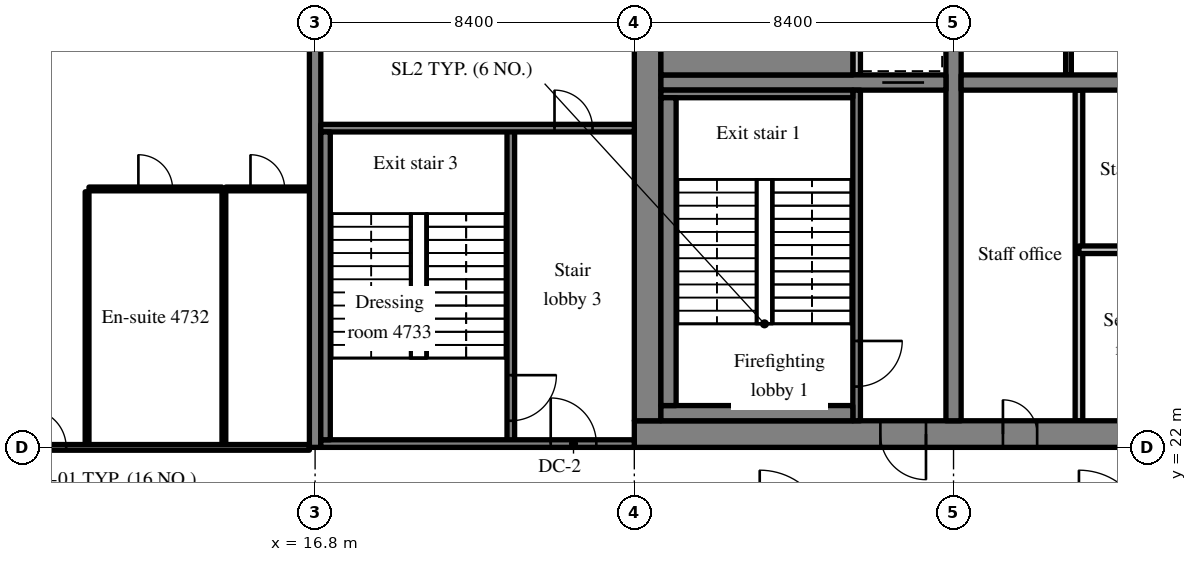
"""IFC4 building model, lengths in metres.
Left out: names, types, materials, properties, quantities, classifications, styles, units other than length and angle.
Written with IfcOpenShell. Run it as: python <this file> out.ifc"""

import sys

from ifc_helpers import new_model, si_unit, direction, frame, frame_2d, origin, place, context, subcontext, project, spatial, rectangle, extrude, source, transform, mapped, element, fill, save


model = new_model("IFC4")
c1 = context("Model", 3, precision=1e-05, world=origin(), true_north=direction((0.0, 1.0)))
c2 = subcontext(c1, "Body", "Model", "MODEL_VIEW")
j1 = project(units=[si_unit("LENGTHUNIT", "METRE"), si_unit("PLANEANGLEUNIT", "RADIAN")], contexts=[c1])
p1 = place(None, origin())
s1 = spatial("IfcSite", under=j1, at=p1, CompositionType="ELEMENT")
p2 = place(p1, origin())
s2 = spatial("IfcBuilding", under=s1, at=p2, CompositionType="ELEMENT")
p3 = place(p2, frame((0.0, 0.0, 193.4)))
s3 = spatial("IfcBuildingStorey", under=s2, at=p3, CompositionType="ELEMENT", Elevation=193.4)
m1 = source(origin(), c2, "Body", "SweptSolid", [
    extrude(rectangle(XDim=50.4, YDim=0.7, at=frame_2d((25.2, 0.0))), origin(), (0.0, 0.0, 1.0), 3.52),
])
p4 = place(p3, frame((25.2, 22.35, 0.0), z_axis=(0.0, 0.0, 1.0), x_axis=(1.0, 0.0, 0.0)))
e1 = element("IfcWall", 1, at=p4, inside=s3, PredefinedType="SHEAR", context=c2, shape_type="MappedRepresentation", body=[
    mapped(m1, transform((0.0, 0.0, 0.0), scale=1.0)),
])
m2 = source(origin(), c2, "Body", "SweptSolid", [
    extrude(rectangle(XDim=1.8, YDim=2.1, at=frame_2d((0.9, 1.05))), frame((0.0, 0.36, 0.0), z_axis=(0.0, -1.0, 0.0), x_axis=(1.0, 0.0, 0.0)), (0.0, 0.0, 1.0), 0.72),
])
p5 = place(p4, frame((15.9, 0.0, 0.0)))
e2 = element("IfcOpeningElement", 2, at=p5, cuts=e1, PredefinedType="OPENING", context=c2, shape_type="MappedRepresentation", body=[
    mapped(m2, transform((0.0, 0.0, 0.0), scale=1.0)),
])
m3 = source(origin(), c2, "Body", "SweptSolid", [
    extrude(rectangle(XDim=0.9, YDim=2.1, at=frame_2d((0.45, 1.05))), frame((0.0, 0.36, 0.0), z_axis=(0.0, -1.0, 0.0), x_axis=(1.0, 0.0, 0.0)), (0.0, 0.0, 1.0), 0.72),
])
p6 = place(p4, frame((9.7, 0.0, 0.0)))
e3 = element("IfcOpeningElement", 3, at=p6, cuts=e1, PredefinedType="OPENING", context=c2, shape_type="MappedRepresentation", body=[
    mapped(m3, transform((0.0, 0.0, 0.0), scale=1.0)),
])
p7 = place(p4, frame((21.5, 0.0, 0.0)))
e4 = element("IfcOpeningElement", 4, at=p7, cuts=e1, PredefinedType="OPENING", context=c2, shape_type="MappedRepresentation", body=[
    mapped(m3, transform((0.0, 0.0, 0.0), scale=1.0)),
])
p8 = place(p4, frame((32.7, 0.0, 0.0)))
e5 = element("IfcOpeningElement", 5, at=p8, cuts=e1, PredefinedType="OPENING", context=c2, shape_type="MappedRepresentation", body=[
    mapped(m2, transform((0.0, 0.0, 0.0), scale=1.0)),
])
m4 = source(origin(), c2, "Body", "SweptSolid", [
    extrude(rectangle(XDim=1.2, YDim=2.1, at=frame_2d((0.6, 1.05))), frame((0.0, 0.36, 0.0), z_axis=(0.0, -1.0, 0.0), x_axis=(1.0, 0.0, 0.0)), (0.0, 0.0, 1.0), 0.72),
])
p9 = place(p4, frame((6.475, 0.0, 0.0)))
e6 = element("IfcOpeningElement", 6, at=p9, cuts=e1, PredefinedType="OPENING", context=c2, shape_type="MappedRepresentation", body=[
    mapped(m4, transform((0.0, 0.0, 0.0), scale=1.0)),
])
p10 = place(p4, frame((47.875, 0.0, 0.0)))
e7 = element("IfcOpeningElement", 7, at=p10, cuts=e1, PredefinedType="OPENING", context=c2, shape_type="MappedRepresentation", body=[
    mapped(m4, transform((0.0, 0.0, 0.0), scale=1.0)),
])
m5 = source(origin(), c2, "Body", "SweptSolid", [
    extrude(rectangle(XDim=18.6, YDim=0.7, at=frame_2d((9.3, 0.0))), origin(), (0.0, 0.0, 1.0), 3.52),
])
p11 = place(p3, frame((25.55, 22.7, 0.0), z_axis=(0.0, 0.0, 1.0), x_axis=(0.0, 1.0, 0.0)))
e8 = element("IfcWall", 8, at=p11, inside=s3, PredefinedType="SHEAR", context=c2, shape_type="MappedRepresentation", body=[
    mapped(m5, transform((0.0, 0.0, 0.0), scale=1.0)),
])
m6 = source(origin(), c2, "Body", "SweptSolid", [
    extrude(rectangle(XDim=18.6, YDim=0.4, at=frame_2d((9.3, 0.0))), origin(), (0.0, 0.0, 1.0), 3.52),
])
p12 = place(p3, frame((33.6, 22.7, 0.0), z_axis=(0.0, 0.0, 1.0), x_axis=(0.0, 1.0, 0.0)))
e9 = element("IfcWall", 9, at=p12, inside=s3, PredefinedType="SHEAR", context=c2, shape_type="MappedRepresentation", body=[
    mapped(m6, transform((0.0, 0.0, 0.0), scale=1.0)),
])
m7 = source(origin(), c2, "Body", "SweptSolid", [
    extrude(rectangle(XDim=1.1, YDim=2.1, at=frame_2d((0.55, 1.05))), frame((0.0, 0.21, 0.0), z_axis=(0.0, -1.0, 0.0), x_axis=(1.0, 0.0, 0.0)), (0.0, 0.0, 1.0), 0.42),
])
p13 = place(p12, frame((12.75, 0.0, 0.0)))
e10 = element("IfcOpeningElement", 10, at=p13, cuts=e9, PredefinedType="OPENING", context=c2, shape_type="MappedRepresentation", body=[
    mapped(m7, transform((0.0, 0.0, 0.0), scale=1.0)),
])
m8 = source(origin(), c2, "Body", "SweptSolid", [
    extrude(rectangle(XDim=7.5, YDim=0.4, at=frame_2d((3.75, 0.0))), origin(), (0.0, 0.0, 1.0), 3.52),
])
p14 = place(p3, frame((25.9, 31.6, 0.0), z_axis=(0.0, 0.0, 1.0), x_axis=(1.0, 0.0, 0.0)))
e11 = element("IfcWall", 11, at=p14, inside=s3, PredefinedType="SHEAR", context=c2, shape_type="MappedRepresentation", body=[
    mapped(m8, transform((0.0, 0.0, 0.0), scale=1.0)),
])
p15 = place(p14, frame((5.825, 0.0, 0.0)))
e12 = element("IfcOpeningElement", 12, at=p15, cuts=e11, PredefinedType="OPENING", context=c2, shape_type="MappedRepresentation", body=[
    mapped(m7, transform((0.0, 0.0, 0.0), scale=1.0)),
])
m9 = source(origin(), c2, "Body", "SweptSolid", [
    extrude(rectangle(XDim=16.4, YDim=0.4, at=frame_2d((8.2, 0.0))), origin(), (0.0, 0.0, 1.0), 3.52),
])
p16 = place(p3, frame((33.8, 31.6, 0.0), z_axis=(0.0, 0.0, 1.0), x_axis=(1.0, 0.0, 0.0)))
e13 = element("IfcWall", 13, at=p16, inside=s3, PredefinedType="SHEAR", context=c2, shape_type="MappedRepresentation", body=[
    mapped(m9, transform((0.0, 0.0, 0.0), scale=1.0)),
])
m10 = source(origin(), c2, "Body", "SweptSolid", [
    extrude(rectangle(XDim=1.0, YDim=2.1, at=frame_2d((0.5, 1.05))), frame((0.0, 0.21, 0.0), z_axis=(0.0, -1.0, 0.0), x_axis=(1.0, 0.0, 0.0)), (0.0, 0.0, 1.0), 0.42),
])
p17 = place(p16, frame((14.8, 0.0, 0.0)))
e14 = element("IfcOpeningElement", 14, at=p17, cuts=e13, PredefinedType="OPENING", context=c2, shape_type="MappedRepresentation", body=[
    mapped(m10, transform((0.0, 0.0, 0.0), scale=1.0)),
])
m11 = source(origin(), c2, "Body", "SweptSolid", [
    extrude(rectangle(XDim=20.0, YDim=0.3, at=frame_2d((10.0, 0.0))), origin(), (0.0, 0.0, 1.0), 3.52),
])
p18 = place(p3, frame((16.8, 22.0, 0.0), z_axis=(0.0, 0.0, 1.0), x_axis=(0.0, 1.0, 0.0)))
e15 = element("IfcWall", 15, at=p18, inside=s3, PredefinedType="SHEAR", context=c2, shape_type="MappedRepresentation", body=[
    mapped(m11, transform((0.0, 0.0, 0.0), scale=1.0)),
])
m12 = source(origin(), c2, "Body", "SweptSolid", [
    extrude(rectangle(XDim=8.7, YDim=0.2, at=frame_2d((4.35, 0.0))), origin(), (0.0, 0.0, 1.0), 3.52),
])
p19 = place(p3, frame((36.9, 22.7, 0.0), z_axis=(0.0, 0.0, 1.0), x_axis=(0.0, 1.0, 0.0)))
e16 = element("IfcWall", 16, at=p19, inside=s3, PredefinedType="PARTITIONING", context=c2, shape_type="MappedRepresentation", body=[
    mapped(m12, transform((0.0, 0.0, 0.0), scale=1.0)),
])
m13 = source(origin(), c2, "Body", "SweptSolid", [
    extrude(rectangle(XDim=3.0, YDim=0.2, at=frame_2d((1.5, 0.0))), origin(), (0.0, 0.0, 1.0), 3.52),
])
p20 = place(p3, frame((36.9, 27.2, 0.0), z_axis=(0.0, 0.0, 1.0), x_axis=(1.0, 0.0, 0.0)))
e17 = element("IfcWall", 17, at=p20, inside=s3, PredefinedType="PARTITIONING", context=c2, shape_type="MappedRepresentation", body=[
    mapped(m13, transform((0.0, 0.0, 0.0), scale=1.0)),
])
m14 = source(origin(), c2, "Body", "SweptSolid", [
    extrude(rectangle(XDim=3.2, YDim=0.15, at=frame_2d((1.6, 0.0))), origin(), (0.0, 0.0, 1.0), 3.52),
])
p21 = place(p3, frame((36.625, 31.8, 0.0), z_axis=(0.0, 0.0, 1.0), x_axis=(0.0, 1.0, 0.0)))
e18 = element("IfcWall", 18, at=p21, inside=s3, PredefinedType="PARTITIONING", context=c2, shape_type="MappedRepresentation", body=[
    mapped(m14, transform((0.0, 0.0, 0.0), scale=1.0)),
])
m15 = source(origin(), c2, "Body", "SweptSolid", [
    extrude(rectangle(XDim=8.7, YDim=0.2, at=frame_2d((4.35, 0.0))), origin(), (0.0, 0.0, 1.0), 3.52),
])
p22 = place(p3, frame((31.05, 22.7, 0.0), z_axis=(0.0, 0.0, 1.0), x_axis=(0.0, 1.0, 0.0)))
e19 = element("IfcWall", 19, at=p22, inside=s3, PredefinedType="SOLIDWALL", context=c2, shape_type="MappedRepresentation", body=[
    mapped(m15, transform((0.0, 0.0, 0.0), scale=1.0)),
])
m16 = source(origin(), c2, "Body", "SweptSolid", [
    extrude(rectangle(XDim=1.2, YDim=2.1, at=frame_2d((0.6, 1.05))), frame((0.0, 0.11, 0.0), z_axis=(0.0, -1.0, 0.0), x_axis=(1.0, 0.0, 0.0)), (0.0, 0.0, 1.0), 0.22),
])
p23 = place(p22, frame((0.9, 0.0, 0.0)))
e20 = element("IfcOpeningElement", 20, at=p23, cuts=e19, PredefinedType="OPENING", context=c2, shape_type="MappedRepresentation", body=[
    mapped(m16, transform((0.0, 0.0, 0.0), scale=1.0)),
])
m17 = source(origin(), c2, "Body", "SweptSolid", [
    extrude(rectangle(XDim=1.8, YDim=0.2, at=frame_2d((0.9, 0.0))), origin(), (0.0, 0.0, 1.0), 3.52),
])
p24 = place(p3, frame((31.05, 31.8, 0.0), z_axis=(0.0, 0.0, 1.0), x_axis=(0.0, 1.0, 0.0)))
e21 = element("IfcWall", 21, at=p24, inside=s3, PredefinedType="SOLIDWALL", context=c2, shape_type="MappedRepresentation", body=[
    mapped(m17, transform((0.0, 0.0, 0.0), scale=1.0)),
])
m18 = source(origin(), c2, "Body", "SweptSolid", [
    extrude(rectangle(XDim=8.3, YDim=0.2, at=frame_2d((4.15, 0.0))), origin(), (0.0, 0.0, 1.0), 3.52),
])
p25 = place(p3, frame((21.95, 22.1, 0.0), z_axis=(0.0, 0.0, 1.0), x_axis=(0.0, 1.0, 0.0)))
e22 = element("IfcWall", 22, at=p25, inside=s3, PredefinedType="SOLIDWALL", context=c2, shape_type="MappedRepresentation", body=[
    mapped(m18, transform((0.0, 0.0, 0.0), scale=1.0)),
])
p26 = place(p25, frame((0.6, 0.0, 0.0)))
e23 = element("IfcOpeningElement", 23, at=p26, cuts=e22, PredefinedType="OPENING", context=c2, shape_type="MappedRepresentation", body=[
    mapped(m16, transform((0.0, 0.0, 0.0), scale=1.0)),
])
m19 = source(origin(), c2, "Body", "SweptSolid", [
    extrude(rectangle(XDim=8.25, YDim=0.2, at=frame_2d((4.125, 0.0))), origin(), (0.0, 0.0, 1.0), 3.52),
])
p27 = place(p3, frame((16.95, 22.1, 0.0), z_axis=(0.0, 0.0, 1.0), x_axis=(1.0, 0.0, 0.0)))
e24 = element("IfcWall", 24, at=p27, inside=s3, PredefinedType="SOLIDWALL", context=c2, shape_type="MappedRepresentation", body=[
    mapped(m19, transform((0.0, 0.0, 0.0), scale=1.0)),
])
p28 = place(p27, frame((6.05, 0.0, 0.0)))
e25 = element("IfcOpeningElement", 25, at=p28, cuts=e24, PredefinedType="OPENING", context=c2, shape_type="MappedRepresentation", body=[
    mapped(m16, transform((0.0, 0.0, 0.0), scale=1.0)),
])
p29 = place(p3, frame((16.95, 30.4, 0.0), z_axis=(0.0, 0.0, 1.0), x_axis=(1.0, 0.0, 0.0)))
e26 = element("IfcWall", 26, at=p29, inside=s3, PredefinedType="SOLIDWALL", context=c2, shape_type="MappedRepresentation", body=[
    mapped(m19, transform((0.0, 0.0, 0.0), scale=1.0)),
])
m20 = source(origin(), c2, "Body", "SweptSolid", [
    extrude(rectangle(XDim=1.0, YDim=2.1, at=frame_2d((0.5, 1.05))), frame((0.0, 0.11, 0.0), z_axis=(0.0, -1.0, 0.0), x_axis=(1.0, 0.0, 0.0)), (0.0, 0.0, 1.0), 0.22),
])
p30 = place(p29, frame((6.15, 0.0, 0.0)))
e27 = element("IfcOpeningElement", 27, at=p30, cuts=e26, PredefinedType="OPENING", context=c2, shape_type="MappedRepresentation", body=[
    mapped(m20, transform((0.0, 0.0, 0.0), scale=1.0)),
])
m21 = source(origin(), c2, "Body", "SweptSolid", [
    extrude(rectangle(XDim=5.05, YDim=0.4, at=frame_2d((2.525, 0.0))), origin(), (0.0, 0.0, 1.0), 3.52),
])
p31 = place(p3, frame((25.9, 22.9, 0.0), z_axis=(0.0, 0.0, 1.0), x_axis=(1.0, 0.0, 0.0)))
e28 = element("IfcWall", 28, at=p31, inside=s3, PredefinedType="SOLIDWALL", context=c2, shape_type="MappedRepresentation", body=[
    mapped(m21, transform((0.0, 0.0, 0.0), scale=1.0)),
])
m22 = source(origin(), c2, "Body", "SweptSolid", [
    extrude(rectangle(XDim=5.05, YDim=0.2, at=frame_2d((2.525, 0.0))), origin(), (0.0, 0.0, 1.0), 3.52),
])
p32 = place(p3, frame((25.9, 31.3, 0.0), z_axis=(0.0, 0.0, 1.0), x_axis=(1.0, 0.0, 0.0)))
e29 = element("IfcWall", 29, at=p32, inside=s3, PredefinedType="SOLIDWALL", context=c2, shape_type="MappedRepresentation", body=[
    mapped(m22, transform((0.0, 0.0, 0.0), scale=1.0)),
])
m23 = source(origin(), c2, "Body", "SweptSolid", [
    extrude(rectangle(XDim=8.1, YDim=0.4, at=frame_2d((4.05, 0.0))), origin(), (0.0, 0.0, 1.0), 3.52),
])
p33 = place(p3, frame((26.1, 23.1, 0.0), z_axis=(0.0, 0.0, 1.0), x_axis=(0.0, 1.0, 0.0)))
e30 = element("IfcWall", 30, at=p33, inside=s3, PredefinedType="SOLIDWALL", context=c2, shape_type="MappedRepresentation", body=[
    mapped(m23, transform((0.0, 0.0, 0.0), scale=1.0)),
])
m24 = source(origin(), c2, "Body", "SweptSolid", [
    extrude(rectangle(XDim=8.1, YDim=0.25, at=frame_2d((4.05, 0.0))), origin(), (0.0, 0.0, 1.0), 3.52),
])
p34 = place(p3, frame((17.075, 22.2, 0.0), z_axis=(0.0, 0.0, 1.0), x_axis=(0.0, 1.0, 0.0)))
e31 = element("IfcWall", 31, at=p34, inside=s3, PredefinedType="SOLIDWALL", context=c2, shape_type="MappedRepresentation", body=[
    mapped(m24, transform((0.0, 0.0, 0.0), scale=1.0)),
])
m25 = source(origin(), c2, "Body", "SweptSolid", [
    extrude(rectangle(XDim=5.05, YDim=1.0, at=frame_2d((2.525, 0.0))), origin(), (0.0, 0.0, 1.0), 3.52),
])
p35 = place(p3, frame((25.9, 32.3, 0.0), z_axis=(0.0, 0.0, 1.0), x_axis=(1.0, 0.0, 0.0)))
e32 = element("IfcWall", 32, at=p35, inside=s3, PredefinedType="SOLIDWALL", context=c2, shape_type="MappedRepresentation", body=[
    mapped(m25, transform((0.0, 0.0, 0.0), scale=1.0)),
])
m26 = source(origin(), c2, "Body", "SweptSolid", [
    extrude(rectangle(XDim=6.65, YDim=0.1, at=frame_2d((3.325, 0.0))), origin(), (0.0, 0.0, 1.0), 3.52),
])
for number, where, z_axis, x_axis in (
    (33, (10.8, 22.075, 0.0), (0.0, 0.0, 1.0), (0.0, 1.0, 0.0)),
    (34, (14.4, 22.075, 0.0), (0.0, 0.0, 1.0), (0.0, 1.0, 0.0)),
):
    element("IfcWall", number, at=place(p3, frame(where, z_axis=z_axis, x_axis=x_axis)), inside=s3, PredefinedType="PARTITIONING", context=c2, shape_type="MappedRepresentation", body=[
        mapped(m26, transform((0.0, 0.0, 0.0), scale=1.0)),
    ])
m27 = source(origin(), c2, "Body", "SweptSolid", [
    extrude(rectangle(XDim=3.5, YDim=0.1, at=frame_2d((1.75, 0.0))), origin(), (0.0, 0.0, 1.0), 3.52),
])
p36 = place(p3, frame((10.85, 28.8, 0.0), z_axis=(0.0, 0.0, 1.0), x_axis=(1.0, 0.0, 0.0)))
e35 = element("IfcWall", 35, at=p36, inside=s3, PredefinedType="PARTITIONING", context=c2, shape_type="MappedRepresentation", body=[
    mapped(m27, transform((0.0, 0.0, 0.0), scale=1.0)),
])
m28 = source(origin(), c2, "Body", "SweptSolid", [
    extrude(rectangle(XDim=0.9, YDim=2.1, at=frame_2d((0.45, 1.05))), frame((0.0, 0.06, 0.0), z_axis=(0.0, -1.0, 0.0), x_axis=(1.0, 0.0, 0.0)), (0.0, 0.0, 1.0), 0.12),
])
p37 = place(p36, frame((1.3, 0.0, 0.0)))
e36 = element("IfcOpeningElement", 36, at=p37, cuts=e35, PredefinedType="OPENING", context=c2, shape_type="MappedRepresentation", body=[
    mapped(m28, transform((0.0, 0.0, 0.0), scale=1.0)),
])
m29 = source(origin(), c2, "Body", "SweptSolid", [
    extrude(rectangle(XDim=2.2, YDim=0.1, at=frame_2d((1.1, 0.0))), origin(), (0.0, 0.0, 1.0), 3.52),
])
p38 = place(p3, frame((14.45, 28.8, 0.0), z_axis=(0.0, 0.0, 1.0), x_axis=(1.0, 0.0, 0.0)))
e37 = element("IfcWall", 37, at=p38, inside=s3, PredefinedType="PARTITIONING", context=c2, shape_type="MappedRepresentation", body=[
    mapped(m29, transform((0.0, 0.0, 0.0), scale=1.0)),
])
p39 = place(p38, frame((0.65, 0.0, 0.0)))
e38 = element("IfcOpeningElement", 38, at=p39, cuts=e37, PredefinedType="OPENING", context=c2, shape_type="MappedRepresentation", body=[
    mapped(m28, transform((0.0, 0.0, 0.0), scale=1.0)),
])
m30 = source(origin(), c2, "Body", "SweptSolid", [
    extrude(rectangle(XDim=7.95, YDim=0.15, at=frame_2d((3.975, 0.0))), origin(), (0.0, 0.0, 1.0), 2.82),
])
p40 = place(p3, frame((8.7, 22.0, 0.0), z_axis=(0.0, 0.0, 1.0), x_axis=(1.0, 0.0, 0.0)))
e39 = element("IfcWall", 39, at=p40, inside=s3, PredefinedType="PARTITIONING", context=c2, shape_type="MappedRepresentation", body=[
    mapped(m30, transform((0.0, 0.0, 0.0), scale=1.0)),
])
m31 = source(origin(), c2, "Body", "SweptSolid", [
    extrude(rectangle(XDim=1.0, YDim=2.1, at=frame_2d((0.5, 1.05))), frame((0.0, 0.085, 0.0), z_axis=(0.0, -1.0, 0.0), x_axis=(1.0, 0.0, 0.0)), (0.0, 0.0, 1.0), 0.17),
])
p41 = place(p40, frame((0.55, 0.0, 0.0)))
e40 = element("IfcOpeningElement", 40, at=p41, cuts=e39, PredefinedType="OPENING", context=c2, shape_type="MappedRepresentation", body=[
    mapped(m31, transform((0.0, 0.0, 0.0), scale=1.0)),
])
m32 = source(origin(), c2, "Body", "SweptSolid", [
    extrude(rectangle(XDim=0.9, YDim=2.1, at=frame_2d((0.45, 1.05))), frame((0.0, 0.275, 0.0), z_axis=(0.0, -1.0, 0.0), x_axis=(1.0, 0.0, 0.0)), (0.0, 0.0, 1.0), 0.05),
])
p42 = place(p6, origin())
e41 = element("IfcDoor", 41, at=p42, inside=s3, OperationType="SINGLE_SWING_LEFT", PredefinedType="DOOR", context=c2, shape_type="MappedRepresentation", body=[
    mapped(m32, transform((0.0, 0.0, 0.0), scale=1.0)),
])
fill(e3, e41)
m33 = source(origin(), c2, "Body", "SweptSolid", [
    extrude(rectangle(XDim=1.2, YDim=2.1, at=frame_2d((0.6, 1.05))), frame((0.0, 0.025, 0.0), z_axis=(0.0, -1.0, 0.0), x_axis=(1.0, 0.0, 0.0)), (0.0, 0.0, 1.0), 0.05),
])
p43 = place(p23, origin())
e42 = element("IfcDoor", 42, at=p43, inside=s3, OperationType="SINGLE_SWING_RIGHT", PredefinedType="DOOR", context=c2, shape_type="MappedRepresentation", body=[
    mapped(m33, transform((0.0, 0.0, 0.0), scale=1.0)),
])
fill(e20, e42)
m34 = source(origin(), c2, "Body", "SweptSolid", [
    extrude(rectangle(XDim=1.2, YDim=2.1, at=frame_2d((0.6, 1.05))), frame((0.0, 0.275, 0.0), z_axis=(0.0, -1.0, 0.0), x_axis=(1.0, 0.0, 0.0)), (0.0, 0.0, 1.0), 0.05),
])
p44 = place(p9, origin())
e43 = element("IfcDoor", 43, at=p44, inside=s3, OperationType="SINGLE_SWING_RIGHT", PredefinedType="DOOR", context=c2, shape_type="MappedRepresentation", body=[
    mapped(m34, transform((0.0, 0.0, 0.0), scale=1.0)),
])
fill(e6, e43)
m35 = source(origin(), c2, "Body", "SweptSolid", [
    extrude(rectangle(XDim=1.1, YDim=2.1, at=frame_2d((0.55, 1.05))), frame((0.0, 0.025, 0.0), z_axis=(0.0, -1.0, 0.0), x_axis=(1.0, 0.0, 0.0)), (0.0, 0.0, 1.0), 0.05),
])
p45 = place(p15, origin())
e44 = element("IfcDoor", 44, at=p45, inside=s3, OperationType="SLIDING_TO_RIGHT", PredefinedType="DOOR", context=c2, shape_type="MappedRepresentation", body=[
    mapped(m35, transform((0.0, 0.0, 0.0), scale=1.0)),
])
fill(e12, e44)
p46 = place(p26, origin())
e45 = element("IfcDoor", 45, at=p46, inside=s3, OperationType="SINGLE_SWING_RIGHT", PredefinedType="DOOR", context=c2, shape_type="MappedRepresentation", body=[
    mapped(m33, transform((0.0, 0.0, 0.0), scale=1.0)),
])
fill(e23, e45)
p47 = place(p28, origin())
e46 = element("IfcDoor", 46, at=p47, inside=s3, OperationType="SINGLE_SWING_LEFT", PredefinedType="DOOR", context=c2, shape_type="MappedRepresentation", body=[
    mapped(m33, transform((0.0, 0.0, 0.0), scale=1.0)),
])
fill(e25, e46)
m36 = source(origin(), c2, "Body", "SweptSolid", [
    extrude(rectangle(XDim=1.0, YDim=2.1, at=frame_2d((0.5, 1.05))), frame((0.0, 0.025, 0.0), z_axis=(0.0, -1.0, 0.0), x_axis=(1.0, 0.0, 0.0)), (0.0, 0.0, 1.0), 0.05),
])
p48 = place(p30, origin())
e47 = element("IfcDoor", 47, at=p48, inside=s3, OperationType="SINGLE_SWING_LEFT", PredefinedType="DOOR", context=c2, shape_type="MappedRepresentation", body=[
    mapped(m36, transform((0.0, 0.0, 0.0), scale=1.0)),
])
fill(e27, e47)
m37 = source(origin(), c2, "Body", "SweptSolid", [
    extrude(rectangle(XDim=0.9, YDim=2.1, at=frame_2d((0.45, 1.05))), frame((0.0, 0.025, 0.0), z_axis=(0.0, -1.0, 0.0), x_axis=(1.0, 0.0, 0.0)), (0.0, 0.0, 1.0), 0.05),
])
p49 = place(p37, origin())
e48 = element("IfcDoor", 48, at=p49, inside=s3, OperationType="SINGLE_SWING_LEFT", PredefinedType="DOOR", context=c2, shape_type="MappedRepresentation", body=[
    mapped(m37, transform((0.0, 0.0, 0.0), scale=1.0)),
])
fill(e36, e48)
p50 = place(p39, origin())
e49 = element("IfcDoor", 49, at=p50, inside=s3, OperationType="SINGLE_SWING_LEFT", PredefinedType="DOOR", context=c2, shape_type="MappedRepresentation", body=[
    mapped(m37, transform((0.0, 0.0, 0.0), scale=1.0)),
])
fill(e38, e49)
p51 = place(p41, origin())
e50 = element("IfcDoor", 50, at=p51, inside=s3, OperationType="SINGLE_SWING_LEFT", PredefinedType="DOOR", context=c2, shape_type="MappedRepresentation", body=[
    mapped(m36, transform((0.0, 0.0, 0.0), scale=1.0)),
])
fill(e40, e50)
save(model, sys.argv[1])
